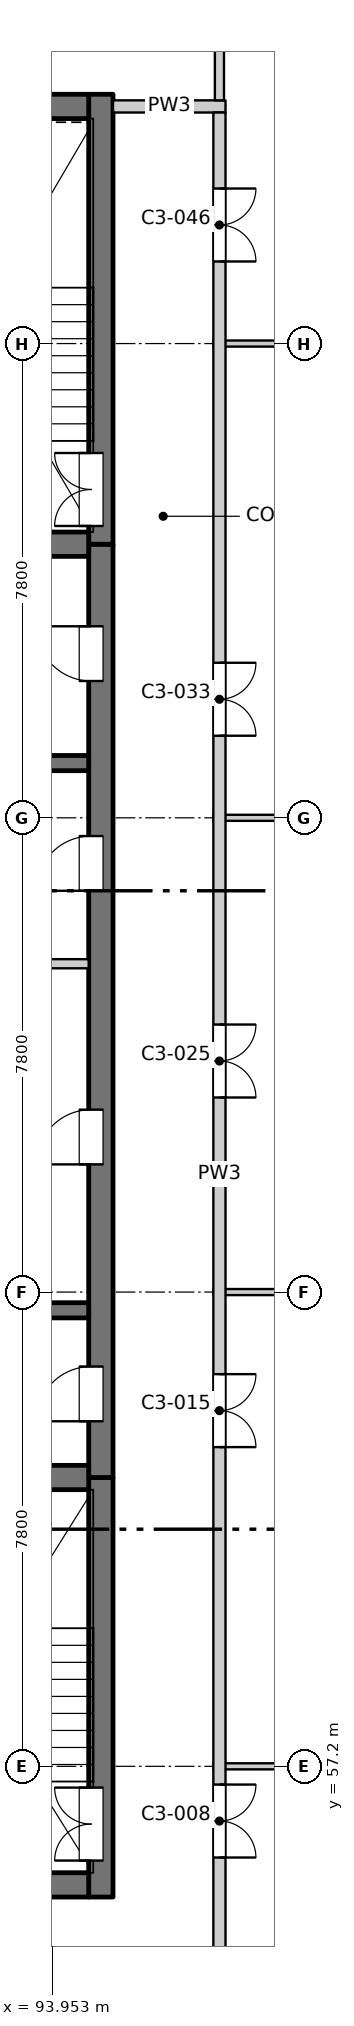
"""IFC4 building model, lengths in metres.
Left out: names, types, materials, properties, quantities, classifications, styles, units other than length and angle.
Written with IfcOpenShell. Run it as: python <this file> out.ifc"""

import sys

from ifc_helpers import new_model, si_unit, direction, frame, frame_2d, origin, place, context, subcontext, project, spatial, rectangle, extrude, element, fill, save


model = new_model("IFC4")
c1 = context("Model", 3, precision=1e-05, world=origin(), true_north=direction((0.0, 1.0)))
c2 = subcontext(c1, "Body", "Model", "MODEL_VIEW")
j1 = project(units=[si_unit("LENGTHUNIT", "METRE"), si_unit("PLANEANGLEUNIT", "RADIAN")], contexts=[c1])
p1 = place(None, origin())
s1 = spatial("IfcSite", under=j1, at=p1, CompositionType="ELEMENT")
p2 = place(p1, origin())
s2 = spatial("IfcBuilding", under=s1, at=p2, CompositionType="ELEMENT")
p3 = place(p2, frame((0.0, 0.0, 200.7)))
s3 = spatial("IfcBuildingStorey", under=s2, at=p3, CompositionType="ELEMENT", Elevation=200.7)
p4 = place(p3, frame((94.75, 55.05, -0.25), z_axis=(0.0, 0.0, 1.0), x_axis=(0.0, 1.0, 0.0)))
e1 = element("IfcWall", 1, at=p4, inside=s3, PredefinedType="SOLIDWALL", context=c2, shape_type="SweptSolid", body=[
    extrude(rectangle(XDim=6.9, YDim=0.4, at=frame_2d((3.45, 0.0))), origin(), (0.0, 0.0, 1.0), 3.4),
])
p5 = place(p4, frame((0.6, 0.0, 0.25)))
e2 = element("IfcOpeningElement", 2, at=p5, cuts=e1, PredefinedType="OPENING", context=c2, shape_type="SweptSolid", body=[
    extrude(rectangle(XDim=1.2, YDim=2.1, at=frame_2d((0.6, 1.05))), frame((0.0, 0.21, 0.0), z_axis=(0.0, -1.0, 0.0), x_axis=(1.0, 0.0, 0.0)), (0.0, 0.0, 1.0), 0.42),
])
p6 = place(p3, frame((94.75, 61.95, -0.25), z_axis=(0.0, 0.0, 1.0), x_axis=(0.0, 1.0, 0.0)))
e3 = element("IfcWall", 3, at=p6, inside=s3, PredefinedType="SOLIDWALL", context=c2, shape_type="SweptSolid", body=[
    extrude(rectangle(XDim=15.35, YDim=0.4, at=frame_2d((7.675, 0.0))), origin(), (0.0, 0.0, 1.0), 3.4),
])
p7 = place(p6, frame((0.925, 0.0, 0.25)))
e4 = element("IfcOpeningElement", 4, at=p7, cuts=e3, PredefinedType="OPENING", context=c2, shape_type="SweptSolid", body=[
    extrude(rectangle(XDim=0.9, YDim=2.1, at=frame_2d((0.45, 1.05))), frame((0.0, 0.21, 0.0), z_axis=(0.0, -1.0, 0.0), x_axis=(1.0, 0.0, 0.0)), (0.0, 0.0, 1.0), 0.42),
])
p8 = place(p6, frame((5.15, 0.0, 0.25)))
e5 = element("IfcOpeningElement", 5, at=p8, cuts=e3, PredefinedType="OPENING", context=c2, shape_type="SweptSolid", body=[
    extrude(rectangle(XDim=0.9, YDim=2.1, at=frame_2d((0.45, 1.05))), frame((0.0, 0.21, 0.0), z_axis=(0.0, -1.0, 0.0), x_axis=(1.0, 0.0, 0.0)), (0.0, 0.0, 1.0), 0.42),
])
p9 = place(p6, frame((9.65, 0.0, 0.25)))
e6 = element("IfcOpeningElement", 6, at=p9, cuts=e3, PredefinedType="OPENING", context=c2, shape_type="SweptSolid", body=[
    extrude(rectangle(XDim=0.9, YDim=2.1, at=frame_2d((0.45, 1.05))), frame((0.0, 0.21, 0.0), z_axis=(0.0, -1.0, 0.0), x_axis=(1.0, 0.0, 0.0)), (0.0, 0.0, 1.0), 0.42),
])
p10 = place(p6, frame((13.1, 0.0, 0.25)))
e7 = element("IfcOpeningElement", 7, at=p10, cuts=e3, PredefinedType="OPENING", context=c2, shape_type="SweptSolid", body=[
    extrude(rectangle(XDim=0.9, YDim=2.1, at=frame_2d((0.45, 1.05))), frame((0.0, 0.21, 0.0), z_axis=(0.0, -1.0, 0.0), x_axis=(1.0, 0.0, 0.0)), (0.0, 0.0, 1.0), 0.42),
])
p11 = place(p3, frame((94.75, 77.3, -0.25), z_axis=(0.0, 0.0, 1.0), x_axis=(0.0, 1.0, 0.0)))
e8 = element("IfcWall", 8, at=p11, inside=s3, PredefinedType="SOLIDWALL", context=c2, shape_type="SweptSolid", body=[
    extrude(rectangle(XDim=7.4, YDim=0.4, at=frame_2d((3.7, 0.0))), origin(), (0.0, 0.0, 1.0), 3.4),
])
p12 = place(p11, frame((0.3, 0.0, 0.25)))
e9 = element("IfcOpeningElement", 9, at=p12, cuts=e8, PredefinedType="OPENING", context=c2, shape_type="SweptSolid", body=[
    extrude(rectangle(XDim=1.2, YDim=2.1, at=frame_2d((0.6, 1.05))), frame((0.0, 0.21, 0.0), z_axis=(0.0, -1.0, 0.0), x_axis=(1.0, 0.0, 0.0)), (0.0, 0.0, 1.0), 0.42),
])
p13 = place(p3, frame((75.45, 55.25, -0.25), z_axis=(0.0, 0.0, 1.0), x_axis=(1.0, 0.0, 0.0)))
e10 = element("IfcWall", 10, at=p13, inside=s3, PredefinedType="SOLIDWALL", context=c2, shape_type="SweptSolid", body=[
    extrude(rectangle(XDim=19.1, YDim=0.4, at=frame_2d((9.55, 0.0))), origin(), (0.0, 0.0, 1.0), 3.4),
])
p14 = place(p13, frame((8.8, 0.0, 0.25)))
e11 = element("IfcOpeningElement", 11, at=p14, cuts=e10, PredefinedType="OPENING", context=c2, shape_type="SweptSolid", body=[
    extrude(rectangle(XDim=1.5, YDim=2.1, at=frame_2d((0.75, 1.05))), frame((0.0, 0.21, 0.0), z_axis=(0.0, -1.0, 0.0), x_axis=(1.0, 0.0, 0.0)), (0.0, 0.0, 1.0), 0.42),
])
p15 = place(p3, frame((75.45, 84.5, -0.25), z_axis=(0.0, 0.0, 1.0), x_axis=(1.0, 0.0, 0.0)))
e12 = element("IfcWall", 12, at=p15, inside=s3, PredefinedType="SOLIDWALL", context=c2, shape_type="SweptSolid", body=[
    extrude(rectangle(XDim=19.1, YDim=0.4, at=frame_2d((9.55, 0.0))), origin(), (0.0, 0.0, 1.0), 3.4),
])
p16 = place(p3, frame((90.675, 61.95, -0.25), z_axis=(0.0, 0.0, 1.0), x_axis=(1.0, 0.0, 0.0)))
e13 = element("IfcWall", 13, at=p16, inside=s3, PredefinedType="SOLIDWALL", context=c2, shape_type="SweptSolid", body=[
    extrude(rectangle(XDim=3.875, YDim=0.4, at=frame_2d((1.938, 0.0))), origin(), (0.0, 0.0, 1.0), 3.4),
])
for number, where, z_axis, x_axis in (
    (14, (90.675, 64.7, -0.25), (0.0, 0.0, 1.0), (1.0, 0.0, 0.0)),
    (15, (90.675, 73.7, -0.25), (0.0, 0.0, 1.0), (1.0, 0.0, 0.0)),
):
    element("IfcWall", number, at=place(p3, frame(where, z_axis=z_axis, x_axis=x_axis)), inside=s3, PredefinedType="SOLIDWALL", context=c2, shape_type="SweptSolid", body=[
        extrude(rectangle(XDim=3.875, YDim=0.25, at=frame_2d((1.938, 0.0))), origin(), (0.0, 0.0, 1.0), 3.4),
    ])
p17 = place(p3, frame((90.675, 77.3, -0.25), z_axis=(0.0, 0.0, 1.0), x_axis=(1.0, 0.0, 0.0)))
e16 = element("IfcWall", 16, at=p17, inside=s3, PredefinedType="SOLIDWALL", context=c2, shape_type="SweptSolid", body=[
    extrude(rectangle(XDim=3.875, YDim=0.4, at=frame_2d((1.938, 0.0))), origin(), (0.0, 0.0, 1.0), 3.4),
])
for number, where, z_axis, x_axis in (
    (17, (96.6, 57.2, 0.0), (0.0, 0.0, 1.0), (1.0, 0.0, 0.0)),
    (18, (96.6, 65.0, 0.0), (0.0, 0.0, 1.0), (1.0, 0.0, 0.0)),
):
    element("IfcWall", number, at=place(p3, frame(where, z_axis=z_axis, x_axis=x_axis)), inside=s3, PredefinedType="PARTITIONING", context=c2, shape_type="SweptSolid", body=[
        extrude(rectangle(XDim=11.665, YDim=0.1, at=frame_2d((5.833, 0.0))), origin(), (0.0, 0.0, 1.0), 3.15),
    ])
p18 = place(p3, frame((90.675, 70.4, 0.0), z_axis=(0.0, 0.0, 1.0), x_axis=(1.0, 0.0, 0.0)))
e19 = element("IfcWall", 19, at=p18, inside=s3, PredefinedType="PARTITIONING", context=c2, shape_type="SweptSolid", body=[
    extrude(rectangle(XDim=3.875, YDim=0.15, at=frame_2d((1.938, 0.0))), origin(), (0.0, 0.0, 1.0), 3.15),
])
for number, where, z_axis, x_axis in (
    (20, (96.6, 72.8, 0.0), (0.0, 0.0, 1.0), (1.0, 0.0, 0.0)),
    (21, (96.6, 80.6, 0.0), (0.0, 0.0, 1.0), (1.0, 0.0, 0.0)),
):
    element("IfcWall", number, at=place(p3, frame(where, z_axis=z_axis, x_axis=x_axis)), inside=s3, PredefinedType="PARTITIONING", context=c2, shape_type="SweptSolid", body=[
        extrude(rectangle(XDim=11.665, YDim=0.1, at=frame_2d((5.833, 0.0))), origin(), (0.0, 0.0, 1.0), 3.15),
    ])
p19 = place(p3, frame((94.95, 84.5, 0.0), z_axis=(0.0, 0.0, 1.0), x_axis=(1.0, 0.0, 0.0)))
e22 = element("IfcWall", 22, at=p19, inside=s3, PredefinedType="PARTITIONING", context=c2, shape_type="SweptSolid", body=[
    extrude(rectangle(XDim=1.85, YDim=0.2, at=frame_2d((0.925, 0.0))), origin(), (0.0, 0.0, 1.0), 3.15),
])
p20 = place(p3, frame((96.7, 49.5, 0.0), z_axis=(0.0, 0.0, 1.0), x_axis=(0.0, 1.0, 0.0)))
e23 = element("IfcWall", 23, at=p20, inside=s3, PredefinedType="PARTITIONING", context=c2, shape_type="SweptSolid", body=[
    extrude(rectangle(XDim=34.9, YDim=0.2, at=frame_2d((17.45, 0.0))), origin(), (0.0, 0.0, 1.0), 3.15),
])
p21 = place(p20, frame((6.2, 0.0, 0.0)))
e24 = element("IfcOpeningElement", 24, at=p21, cuts=e23, PredefinedType="OPENING", context=c2, shape_type="SweptSolid", body=[
    extrude(rectangle(XDim=1.2, YDim=2.1, at=frame_2d((0.6, 1.05))), frame((0.0, 0.11, 0.0), z_axis=(0.0, -1.0, 0.0), x_axis=(1.0, 0.0, 0.0)), (0.0, 0.0, 1.0), 0.22),
])
p22 = place(p20, frame((12.95, 0.0, 0.0)))
e25 = element("IfcOpeningElement", 25, at=p22, cuts=e23, PredefinedType="OPENING", context=c2, shape_type="SweptSolid", body=[
    extrude(rectangle(XDim=1.2, YDim=2.1, at=frame_2d((0.6, 1.05))), frame((0.0, 0.11, 0.0), z_axis=(0.0, -1.0, 0.0), x_axis=(1.0, 0.0, 0.0)), (0.0, 0.0, 1.0), 0.22),
])
p23 = place(p20, frame((18.7, 0.0, 0.0)))
e26 = element("IfcOpeningElement", 26, at=p23, cuts=e23, PredefinedType="OPENING", context=c2, shape_type="SweptSolid", body=[
    extrude(rectangle(XDim=1.2, YDim=2.1, at=frame_2d((0.6, 1.05))), frame((0.0, 0.11, 0.0), z_axis=(0.0, -1.0, 0.0), x_axis=(1.0, 0.0, 0.0)), (0.0, 0.0, 1.0), 0.22),
])
p24 = place(p20, frame((24.65, 0.0, 0.0)))
e27 = element("IfcOpeningElement", 27, at=p24, cuts=e23, PredefinedType="OPENING", context=c2, shape_type="SweptSolid", body=[
    extrude(rectangle(XDim=1.2, YDim=2.1, at=frame_2d((0.6, 1.05))), frame((0.0, 0.11, 0.0), z_axis=(0.0, -1.0, 0.0), x_axis=(1.0, 0.0, 0.0)), (0.0, 0.0, 1.0), 0.22),
])
p25 = place(p20, frame((32.45, 0.0, 0.0)))
e28 = element("IfcOpeningElement", 28, at=p25, cuts=e23, PredefinedType="OPENING", context=c2, shape_type="SweptSolid", body=[
    extrude(rectangle(XDim=1.2, YDim=2.1, at=frame_2d((0.6, 1.05))), frame((0.0, 0.11, 0.0), z_axis=(0.0, -1.0, 0.0), x_axis=(1.0, 0.0, 0.0)), (0.0, 0.0, 1.0), 0.22),
])
p26 = place(p3, frame((96.7, 84.6, 0.0), z_axis=(0.0, 0.0, 1.0), x_axis=(0.0, 1.0, 0.0)))
e29 = element("IfcWall", 29, at=p26, inside=s3, PredefinedType="PARTITIONING", context=c2, shape_type="SweptSolid", body=[
    extrude(rectangle(XDim=3.665, YDim=0.15, at=frame_2d((1.833, 0.0))), origin(), (0.0, 0.0, 1.0), 3.15),
])
p27 = place(p26, frame((1.25, 0.0, 0.0)))
e30 = element("IfcOpeningElement", 30, at=p27, cuts=e29, PredefinedType="OPENING", context=c2, shape_type="SweptSolid", body=[
    extrude(rectangle(XDim=1.2, YDim=2.1, at=frame_2d((0.6, 1.05))), frame((0.0, 0.085, 0.0), z_axis=(0.0, -1.0, 0.0), x_axis=(1.0, 0.0, 0.0)), (0.0, 0.0, 1.0), 0.17),
])
p28 = place(p5, origin())
e31 = element("IfcDoor", 31, at=p28, inside=s3, OperationType="DOUBLE_DOOR_SINGLE_SWING", PredefinedType="DOOR", context=c2, shape_type="SweptSolid", body=[
    extrude(rectangle(XDim=1.2, YDim=2.1, at=frame_2d((0.6, 1.05))), frame((0.0, 0.185, 0.0), z_axis=(0.0, -1.0, 0.0), x_axis=(1.0, 0.0, 0.0)), (0.0, 0.0, 1.0), 0.05),
])
fill(e2, e31)
p29 = place(p21, origin())
e32 = element("IfcDoor", 32, at=p29, inside=s3, OperationType="DOUBLE_DOOR_SINGLE_SWING", PredefinedType="DOOR", context=c2, shape_type="SweptSolid", body=[
    extrude(rectangle(XDim=1.2, YDim=2.1, at=frame_2d((0.6, 1.05))), frame((0.0, 0.025, 0.0), z_axis=(0.0, -1.0, 0.0), x_axis=(1.0, 0.0, 0.0)), (0.0, 0.0, 1.0), 0.05),
])
fill(e24, e32)
p30 = place(p22, origin())
e33 = element("IfcDoor", 33, at=p30, inside=s3, OperationType="DOUBLE_DOOR_SINGLE_SWING", PredefinedType="DOOR", context=c2, shape_type="SweptSolid", body=[
    extrude(rectangle(XDim=1.2, YDim=2.1, at=frame_2d((0.6, 1.05))), frame((0.0, 0.025, 0.0), z_axis=(0.0, -1.0, 0.0), x_axis=(1.0, 0.0, 0.0)), (0.0, 0.0, 1.0), 0.05),
])
fill(e25, e33)
p31 = place(p7, origin())
e34 = element("IfcDoor", 34, at=p31, inside=s3, OperationType="SINGLE_SWING_LEFT", PredefinedType="DOOR", context=c2, shape_type="SweptSolid", body=[
    extrude(rectangle(XDim=0.9, YDim=2.1, at=frame_2d((0.45, 1.05))), frame((0.0, 0.185, 0.0), z_axis=(0.0, -1.0, 0.0), x_axis=(1.0, 0.0, 0.0)), (0.0, 0.0, 1.0), 0.05),
])
fill(e4, e34)
p32 = place(p8, origin())
e35 = element("IfcDoor", 35, at=p32, inside=s3, OperationType="SINGLE_SWING_LEFT", PredefinedType="DOOR", context=c2, shape_type="SweptSolid", body=[
    extrude(rectangle(XDim=0.9, YDim=2.1, at=frame_2d((0.45, 1.05))), frame((0.0, 0.185, 0.0), z_axis=(0.0, -1.0, 0.0), x_axis=(1.0, 0.0, 0.0)), (0.0, 0.0, 1.0), 0.05),
])
fill(e5, e35)
p33 = place(p23, origin())
e36 = element("IfcDoor", 36, at=p33, inside=s3, OperationType="DOUBLE_DOOR_SINGLE_SWING", PredefinedType="DOOR", context=c2, shape_type="SweptSolid", body=[
    extrude(rectangle(XDim=1.2, YDim=2.1, at=frame_2d((0.6, 1.05))), frame((0.0, 0.025, 0.0), z_axis=(0.0, -1.0, 0.0), x_axis=(1.0, 0.0, 0.0)), (0.0, 0.0, 1.0), 0.05),
])
fill(e26, e36)
p34 = place(p9, origin())
e37 = element("IfcDoor", 37, at=p34, inside=s3, OperationType="SINGLE_SWING_LEFT", PredefinedType="DOOR", context=c2, shape_type="SweptSolid", body=[
    extrude(rectangle(XDim=0.9, YDim=2.1, at=frame_2d((0.45, 1.05))), frame((0.0, 0.185, 0.0), z_axis=(0.0, -1.0, 0.0), x_axis=(1.0, 0.0, 0.0)), (0.0, 0.0, 1.0), 0.05),
])
fill(e6, e37)
p35 = place(p24, origin())
e38 = element("IfcDoor", 38, at=p35, inside=s3, OperationType="DOUBLE_DOOR_SINGLE_SWING", PredefinedType="DOOR", context=c2, shape_type="SweptSolid", body=[
    extrude(rectangle(XDim=1.2, YDim=2.1, at=frame_2d((0.6, 1.05))), frame((0.0, 0.025, 0.0), z_axis=(0.0, -1.0, 0.0), x_axis=(1.0, 0.0, 0.0)), (0.0, 0.0, 1.0), 0.05),
])
fill(e27, e38)
p36 = place(p10, origin())
e39 = element("IfcDoor", 39, at=p36, inside=s3, OperationType="SINGLE_SWING_RIGHT", PredefinedType="DOOR", context=c2, shape_type="SweptSolid", body=[
    extrude(rectangle(XDim=0.9, YDim=2.1, at=frame_2d((0.45, 1.05))), frame((0.0, 0.185, 0.0), z_axis=(0.0, -1.0, 0.0), x_axis=(1.0, 0.0, 0.0)), (0.0, 0.0, 1.0), 0.05),
])
fill(e7, e39)
p37 = place(p12, origin())
e40 = element("IfcDoor", 40, at=p37, inside=s3, OperationType="DOUBLE_DOOR_SINGLE_SWING", PredefinedType="DOOR", context=c2, shape_type="SweptSolid", body=[
    extrude(rectangle(XDim=1.2, YDim=2.1, at=frame_2d((0.6, 1.05))), frame((0.0, 0.185, 0.0), z_axis=(0.0, -1.0, 0.0), x_axis=(1.0, 0.0, 0.0)), (0.0, 0.0, 1.0), 0.05),
])
fill(e9, e40)
p38 = place(p25, origin())
e41 = element("IfcDoor", 41, at=p38, inside=s3, OperationType="DOUBLE_DOOR_SINGLE_SWING", PredefinedType="DOOR", context=c2, shape_type="SweptSolid", body=[
    extrude(rectangle(XDim=1.2, YDim=2.1, at=frame_2d((0.6, 1.05))), frame((0.0, 0.025, 0.0), z_axis=(0.0, -1.0, 0.0), x_axis=(1.0, 0.0, 0.0)), (0.0, 0.0, 1.0), 0.05),
])
fill(e28, e41)
save(model, sys.argv[1])
